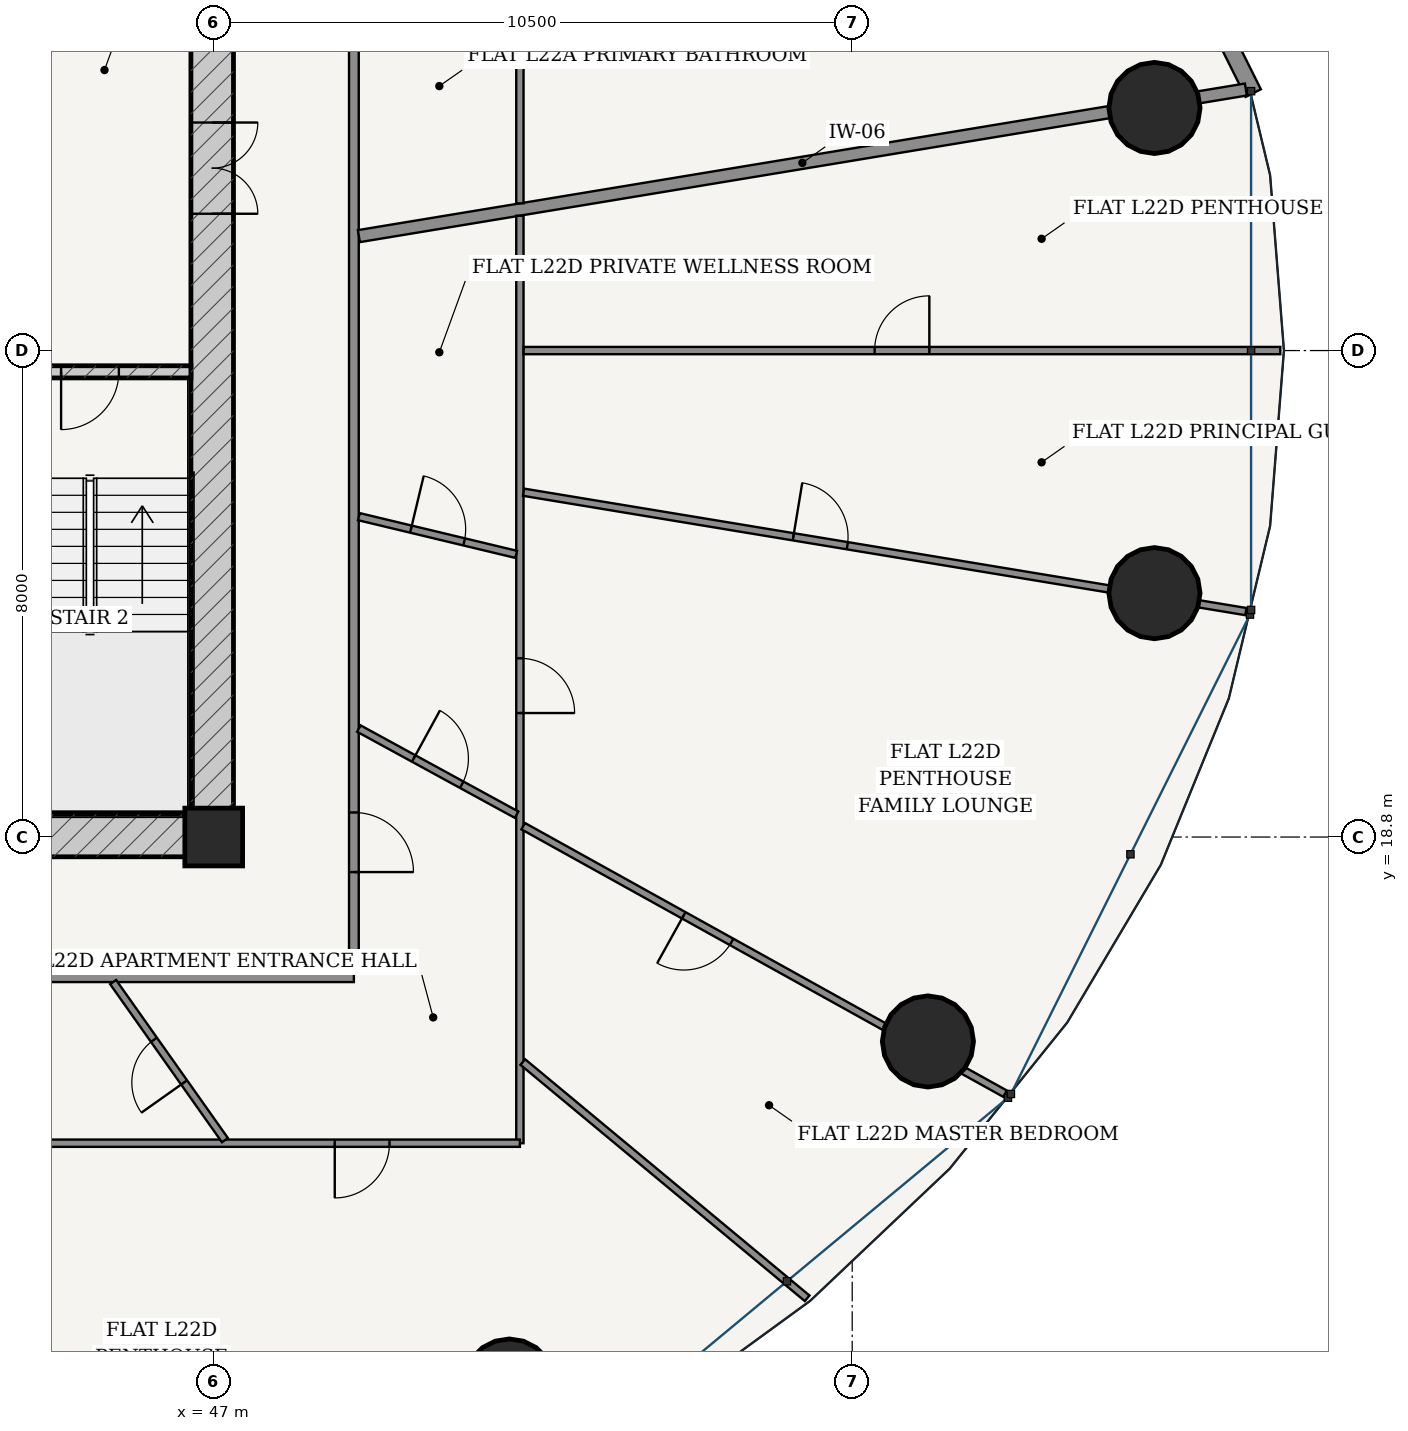
"""IFC4 building model, lengths in metres.
Left out: names, types, materials, properties, quantities, classifications, styles, units other than length and angle.
Written with IfcOpenShell. Run it as: python <this file> out.ifc"""

import sys

from ifc_helpers import new_model, si_unit, direction, frame, frame_2d, origin, origin_2d, place, context, subcontext, project, spatial, rectangle, hollow_circle, extrude, source, transform, mapped, element, fill, save


model = new_model("IFC4")
c1 = context("Model", 3, precision=1e-05, world=origin(), true_north=direction((-0.2419218956, 0.970295726276)))
c2 = subcontext(c1, "Body", "Model", "MODEL_VIEW")
j1 = project(units=[si_unit("LENGTHUNIT", "METRE"), si_unit("PLANEANGLEUNIT", "RADIAN")], contexts=[c1])
p1 = place(None, origin())
s1 = spatial("IfcSite", under=j1, at=p1, CompositionType="ELEMENT")
p2 = place(p1, origin())
s2 = spatial("IfcBuilding", under=s1, at=p2, CompositionType="ELEMENT")
p3 = place(p2, frame((0.0, 0.0, 87.0)))
s3 = spatial("IfcBuildingStorey", under=s2, at=p3, CompositionType="ELEMENT", Elevation=87.0)
p4 = place(p3, frame((47.0, 18.8, 0.0), z_axis=(0.0, 0.0, 1.0), x_axis=(1.0, 0.0, 0.0)))
e1 = element("IfcColumn", 1, at=p4, inside=s3, PredefinedType="COLUMN", context=c2, shape_type="SweptSolid", body=[
    extrude(rectangle(XDim=0.95, YDim=0.95, at=origin_2d()), origin(), (0.0, 0.0, 1.0), 3.6),
])
p5 = place(p3, frame((28.675, 18.825, 0.0), z_axis=(0.0, 0.0, 1.0), x_axis=(1.0, 0.0, 0.0)))
e2 = element("IfcWall", 2, at=p5, inside=s3, PredefinedType="SHEAR", context=c2, shape_type="SweptSolid", body=[
    extrude(rectangle(XDim=18.65, YDim=0.7, at=frame_2d((9.325, 0.0))), origin(), (0.0, 0.0, 1.0), 3.325),
])
p6 = place(p5, frame((7.577, 0.0, 0.0)))
e3 = element("IfcOpeningElement", 3, at=p6, cuts=e2, PredefinedType="OPENING", context=c2, shape_type="SweptSolid", body=[
    extrude(rectangle(XDim=0.85, YDim=2.1, at=frame_2d((0.425, 1.05))), frame((0.0, 0.36, 0.0), z_axis=(0.0, -1.0, 0.0), x_axis=(1.0, 0.0, 0.0)), (0.0, 0.0, 1.0), 0.72),
])
p7 = place(p5, frame((10.623, 0.0, 0.0)))
e4 = element("IfcOpeningElement", 4, at=p7, cuts=e2, PredefinedType="OPENING", context=c2, shape_type="SweptSolid", body=[
    extrude(rectangle(XDim=0.85, YDim=2.1, at=frame_2d((0.425, 1.05))), frame((0.0, 0.36, 0.0), z_axis=(0.0, -1.0, 0.0), x_axis=(1.0, 0.0, 0.0)), (0.0, 0.0, 1.0), 0.72),
])
p8 = place(p3, frame((46.975, 19.175, 0.0), z_axis=(0.0, 0.0, 1.0), x_axis=(0.0, 1.0, 0.0)))
e5 = element("IfcWall", 5, at=p8, inside=s3, PredefinedType="SHEAR", context=c2, shape_type="SweptSolid", body=[
    extrude(rectangle(XDim=15.25, YDim=0.7, at=frame_2d((7.625, 0.0))), origin(), (0.0, 0.0, 1.0), 3.325),
])
p9 = place(p8, frame((9.875, 0.0, 0.0)))
e6 = element("IfcOpeningElement", 6, at=p9, cuts=e5, PredefinedType="OPENING", context=c2, shape_type="SweptSolid", body=[
    extrude(rectangle(XDim=1.5, YDim=2.2, at=frame_2d((0.75, 1.1))), frame((0.0, 0.36, 0.0), z_axis=(0.0, -1.0, 0.0), x_axis=(1.0, 0.0, 0.0)), (0.0, 0.0, 1.0), 0.72),
])
p10 = place(p3, frame((43.305, 26.45, 0.0), z_axis=(0.0, 0.0, 1.0), x_axis=(1.0, 0.0, 0.0)))
e7 = element("IfcWall", 7, at=p10, inside=s3, PredefinedType="SOLIDWALL", context=c2, shape_type="SweptSolid", body=[
    extrude(rectangle(XDim=3.32, YDim=0.2, at=frame_2d((1.66, 0.0))), origin(), (0.0, 0.0, 1.0), 3.325),
])
p11 = place(p10, frame((1.185, 0.0, 0.0)))
e8 = element("IfcOpeningElement", 8, at=p11, cuts=e7, PredefinedType="OPENING", context=c2, shape_type="SweptSolid", body=[
    extrude(rectangle(XDim=0.95, YDim=2.15, at=frame_2d((0.475, 1.075))), frame((0.0, 0.11, 0.0), z_axis=(0.0, -1.0, 0.0), x_axis=(1.0, 0.0, 0.0)), (0.0, 0.0, 1.0), 0.22),
])
for number, where, z_axis, x_axis in (
    (9, (62.471, 30.79, 0.0), (0.0, 0.0, 1.0), (1.0, 0.0, 0.0)),
    (10, (51.862, 9.796, 0.0), (0.0, 0.0, 1.0), (1.0, 0.0, 0.0)),
    (11, (58.745, 15.438, 0.0), (0.0, 0.0, 1.0), (1.0, 0.0, 0.0)),
    (12, (62.471, 22.81, 0.0), (0.0, 0.0, 1.0), (1.0, 0.0, 0.0)),
):
    element("IfcColumn", number, at=place(p3, frame(where, z_axis=z_axis, x_axis=x_axis)), inside=s3, PredefinedType="COLUMN", context=c2, shape_type="SweptSolid", body=[
        extrude(hollow_circle(Radius=0.75, WallThickness=0.045, at=origin_2d()), origin(), (0.0, 0.0, 1.0), 3.6),
    ])
p12 = place(p3, frame((64.095, 31.034, 0.0), z_axis=(0.0, 0.0, 1.0), x_axis=(-0.446263788661, 0.894901464369, 0.0)))
e13 = element("IfcWall", 13, at=p12, inside=s3, PredefinedType="SOLIDWALL", context=c2, shape_type="SweptSolid", body=[
    extrude(rectangle(XDim=9.05, YDim=0.28, at=frame_2d((4.525, 0.0))), origin(), (0.0, 0.0, 1.0), 3.325),
])
p13 = place(p12, frame((1.394, 0.0, 0.85)))
e14 = element("IfcOpeningElement", 14, at=p13, cuts=e13, PredefinedType="OPENING", context=c2, shape_type="SweptSolid", body=[
    extrude(rectangle(XDim=2.1, YDim=1.95, at=frame_2d((1.05, 0.975))), frame((0.0, 0.15, 0.0), z_axis=(0.0, -1.0, 0.0), x_axis=(1.0, 0.0, 0.0)), (0.0, 0.0, 1.0), 0.3),
])
p14 = place(p12, frame((5.557, 0.0, 0.85)))
e15 = element("IfcOpeningElement", 15, at=p14, cuts=e13, PredefinedType="OPENING", context=c2, shape_type="SweptSolid", body=[
    extrude(rectangle(XDim=2.1, YDim=1.95, at=frame_2d((1.05, 0.975))), frame((0.0, 0.15, 0.0), z_axis=(0.0, -1.0, 0.0), x_axis=(1.0, 0.0, 0.0)), (0.0, 0.0, 1.0), 0.3),
])
p15 = place(p3, frame((26.695, 16.495, 0.0), z_axis=(0.0, 0.0, 1.0), x_axis=(1.0, 0.0, 0.0)))
e16 = element("IfcWall", 16, at=p15, inside=s3, PredefinedType="PARTITIONING", context=c2, shape_type="SweptSolid", body=[
    extrude(rectangle(XDim=22.61, YDim=0.16, at=frame_2d((11.305, 0.0))), origin(), (0.0, 0.0, 1.0), 2.767),
])
p16 = place(p3, frame((49.305, 16.575, 0.0), z_axis=(0.0, 0.0, 1.0), x_axis=(0.0, 1.0, 0.0)))
e17 = element("IfcWall", 17, at=p16, inside=s3, PredefinedType="PARTITIONING", context=c2, shape_type="SweptSolid", body=[
    extrude(rectangle(XDim=20.45, YDim=0.16, at=frame_2d((10.225, 0.0))), origin(), (0.0, 0.0, 1.0), 2.767),
])
p17 = place(p16, frame((1.649, 0.0, 0.0)))
e18 = element("IfcOpeningElement", 18, at=p17, cuts=e17, PredefinedType="OPENING", context=c2, shape_type="SweptSolid", body=[
    extrude(rectangle(XDim=0.98, YDim=2.2, at=frame_2d((0.49, 1.1))), frame((0.0, 0.09, 0.0), z_axis=(0.0, -1.0, 0.0), x_axis=(1.0, 0.0, 0.0)), (0.0, 0.0, 1.0), 0.18),
])
p18 = place(p3, frame((49.387, 28.682, 0.0), z_axis=(0.0, 0.0, 1.0), x_axis=(0.986617934215, 0.163049231479, 0.0)))
e19 = element("IfcWall", 19, at=p18, inside=s3, PredefinedType="PARTITIONING", context=c2, shape_type="SweptSolid", body=[
    extrude(rectangle(XDim=14.785, YDim=0.2, at=frame_2d((7.392, 0.0))), origin(), (0.0, 0.0, 1.0), 2.767),
])
p19 = place(p3, frame((52.035, 39.835, 0.0), z_axis=(0.0, 0.0, 1.0), x_axis=(0.0, -1.0, 0.0)))
e20 = element("IfcWall", 20, at=p19, inside=s3, PredefinedType="PARTITIONING", context=c2, shape_type="SweptSolid", body=[
    extrude(rectangle(XDim=10.614, YDim=0.12, at=frame_2d((5.307, 0.0))), origin(), (0.0, 0.0, 1.0), 2.767),
])
p20 = place(p19, frame((2.107, 0.0, 0.0)))
e21 = element("IfcOpeningElement", 21, at=p20, cuts=e20, PredefinedType="OPENING", context=c2, shape_type="SweptSolid", body=[
    extrude(rectangle(XDim=0.9, YDim=2.15, at=frame_2d((0.45, 1.075))), frame((0.0, 0.07, 0.0), z_axis=(0.0, -1.0, 0.0), x_axis=(1.0, 0.0, 0.0)), (0.0, 0.0, 1.0), 0.14),
])
p21 = place(p3, frame((52.035, 29.017, 0.0), z_axis=(0.0, 0.0, 1.0), x_axis=(0.0, -1.0, 0.0)))
e22 = element("IfcWall", 22, at=p21, inside=s3, PredefinedType="PARTITIONING", context=c2, shape_type="SweptSolid", body=[
    extrude(rectangle(XDim=15.252, YDim=0.12, at=frame_2d((7.626, 0.0))), origin(), (0.0, 0.0, 1.0), 2.767),
])
p22 = place(p21, frame((7.278, 0.0, 0.0)))
e23 = element("IfcOpeningElement", 23, at=p22, cuts=e22, PredefinedType="OPENING", context=c2, shape_type="SweptSolid", body=[
    extrude(rectangle(XDim=0.9, YDim=2.15, at=frame_2d((0.45, 1.075))), frame((0.0, 0.07, 0.0), z_axis=(0.0, -1.0, 0.0), x_axis=(1.0, 0.0, 0.0)), (0.0, 0.0, 1.0), 0.14),
])
p23 = place(p3, frame((52.035, 13.765, 0.0), z_axis=(0.0, 0.0, 1.0), x_axis=(-1.0, 0.0, 0.0)))
e24 = element("IfcWall", 24, at=p23, inside=s3, PredefinedType="PARTITIONING", context=c2, shape_type="SweptSolid", body=[
    extrude(rectangle(XDim=10.812, YDim=0.12, at=frame_2d((5.406, 0.0))), origin(), (0.0, 0.0, 1.0), 2.767),
])
p24 = place(p23, frame((2.145, 0.0, 0.0)))
e25 = element("IfcOpeningElement", 25, at=p24, cuts=e24, PredefinedType="OPENING", context=c2, shape_type="SweptSolid", body=[
    extrude(rectangle(XDim=0.9, YDim=2.15, at=frame_2d((0.45, 1.075))), frame((0.0, 0.07, 0.0), z_axis=(0.0, -1.0, 0.0), x_axis=(1.0, 0.0, 0.0)), (0.0, 0.0, 1.0), 0.14),
])
p25 = place(p3, frame((52.083, 15.1, 0.0), z_axis=(0.0, 0.0, 1.0), x_axis=(0.769161827891, -0.63905405289, 0.0)))
e26 = element("IfcWall", 26, at=p25, inside=s3, PredefinedType="PARTITIONING", context=c2, shape_type="SweptSolid", body=[
    extrude(rectangle(XDim=6.08, YDim=0.12, at=frame_2d((3.04, 0.0))), origin(), (0.0, 0.0, 1.0), 2.767),
])
p26 = place(p3, frame((52.089, 18.979, 0.0), z_axis=(0.0, 0.0, 1.0), x_axis=(0.874313476423, -0.485361664066, 0.0)))
e27 = element("IfcWall", 27, at=p26, inside=s3, PredefinedType="PARTITIONING", context=c2, shape_type="SweptSolid", body=[
    extrude(rectangle(XDim=9.066, YDim=0.12, at=frame_2d((4.533, 0.0))), origin(), (0.0, 0.0, 1.0), 2.767),
])
p27 = place(p26, frame((3.02, 0.0, 0.0)))
e28 = element("IfcOpeningElement", 28, at=p27, cuts=e27, PredefinedType="OPENING", context=c2, shape_type="SweptSolid", body=[
    extrude(rectangle(XDim=0.9, YDim=2.15, at=frame_2d((0.45, 1.075))), frame((0.0, 0.07, 0.0), z_axis=(0.0, -1.0, 0.0), x_axis=(1.0, 0.0, 0.0)), (0.0, 0.0, 1.0), 0.14),
])
p28 = place(p3, frame((52.096, 24.47, 0.0), z_axis=(0.0, 0.0, 1.0), x_axis=(0.986618264768, -0.163047231274, 0.0)))
e29 = element("IfcWall", 29, at=p28, inside=s3, PredefinedType="PARTITIONING", context=c2, shape_type="SweptSolid", body=[
    extrude(rectangle(XDim=12.039, YDim=0.12, at=frame_2d((6.02, 0.0))), origin(), (0.0, 0.0, 1.0), 2.767),
])
p29 = place(p28, frame((4.496, 0.0, 0.0)))
e30 = element("IfcOpeningElement", 30, at=p29, cuts=e29, PredefinedType="OPENING", context=c2, shape_type="SweptSolid", body=[
    extrude(rectangle(XDim=0.9, YDim=2.15, at=frame_2d((0.45, 1.075))), frame((0.0, 0.07, 0.0), z_axis=(0.0, -1.0, 0.0), x_axis=(1.0, 0.0, 0.0)), (0.0, 0.0, 1.0), 0.14),
])
p30 = place(p3, frame((52.097, 26.8, 0.0), z_axis=(0.0, 0.0, 1.0), x_axis=(1.0, 0.0, 0.0)))
e31 = element("IfcWall", 31, at=p30, inside=s3, PredefinedType="PARTITIONING", context=c2, shape_type="SweptSolid", body=[
    extrude(rectangle(XDim=12.443, YDim=0.12, at=frame_2d((6.222, 0.0))), origin(), (0.0, 0.0, 1.0), 2.767),
])
p31 = place(p30, frame((5.771, 0.0, 0.0)))
e32 = element("IfcOpeningElement", 32, at=p31, cuts=e31, PredefinedType="OPENING", context=c2, shape_type="SweptSolid", body=[
    extrude(rectangle(XDim=0.9, YDim=2.15, at=frame_2d((0.45, 1.075))), frame((0.0, 0.07, 0.0), z_axis=(0.0, -1.0, 0.0), x_axis=(1.0, 0.0, 0.0)), (0.0, 0.0, 1.0), 0.14),
])
p32 = place(p3, frame((45.345, 16.415, 0.0), z_axis=(0.0, 0.0, 1.0), x_axis=(0.577474693199, -0.816408585645, 0.0)))
e33 = element("IfcWall", 33, at=p32, inside=s3, PredefinedType="PARTITIONING", context=c2, shape_type="SweptSolid", body=[
    extrude(rectangle(XDim=3.184, YDim=0.12, at=frame_2d((1.592, 0.0))), origin(), (0.0, 0.0, 1.0), 3.004),
])
p33 = place(p32, frame((1.162, 0.0, 0.0)))
e34 = element("IfcOpeningElement", 34, at=p33, cuts=e33, PredefinedType="OPENING", context=c2, shape_type="SweptSolid", body=[
    extrude(rectangle(XDim=0.86, YDim=2.15, at=frame_2d((0.43, 1.075))), frame((0.0, 0.07, 0.0), z_axis=(0.0, -1.0, 0.0), x_axis=(1.0, 0.0, 0.0)), (0.0, 0.0, 1.0), 0.14),
])
p34 = place(p3, frame((49.387, 20.583, 0.0), z_axis=(0.0, 0.0, 1.0), x_axis=(0.877718703033, -0.479176249773, 0.0)))
e35 = element("IfcWall", 35, at=p34, inside=s3, PredefinedType="PARTITIONING", context=c2, shape_type="SweptSolid", body=[
    extrude(rectangle(XDim=2.955, YDim=0.12, at=frame_2d((1.478, 0.0))), origin(), (0.0, 0.0, 1.0), 2.767),
])
p35 = place(p34, frame((1.028, 0.0, 0.0)))
e36 = element("IfcOpeningElement", 36, at=p35, cuts=e35, PredefinedType="OPENING", context=c2, shape_type="SweptSolid", body=[
    extrude(rectangle(XDim=0.9, YDim=2.15, at=frame_2d((0.45, 1.075))), frame((0.0, 0.07, 0.0), z_axis=(0.0, -1.0, 0.0), x_axis=(1.0, 0.0, 0.0)), (0.0, 0.0, 1.0), 0.14),
])
p36 = place(p3, frame((49.387, 24.069, 0.0), z_axis=(0.0, 0.0, 1.0), x_axis=(0.972423933179, -0.233220269661, 0.0)))
e37 = element("IfcWall", 37, at=p36, inside=s3, PredefinedType="PARTITIONING", context=c2, shape_type="SweptSolid", body=[
    extrude(rectangle(XDim=2.661, YDim=0.12, at=frame_2d((1.331, 0.0))), origin(), (0.0, 0.0, 1.0), 3.325),
])
p37 = place(p36, frame((0.881, 0.0, 0.0)))
e38 = element("IfcOpeningElement", 38, at=p37, cuts=e37, PredefinedType="OPENING", context=c2, shape_type="SweptSolid", body=[
    extrude(rectangle(XDim=0.9, YDim=2.15, at=frame_2d((0.45, 1.075))), frame((0.0, 0.07, 0.0), z_axis=(0.0, -1.0, 0.0), x_axis=(1.0, 0.0, 0.0)), (0.0, 0.0, 1.0), 0.14),
])
m1 = source(origin(), c2, "Body", "SweptSolid", [
    extrude(rectangle(XDim=1.5, YDim=2.2, at=frame_2d((0.75, 1.1))), frame((0.0, 0.025, 0.0), z_axis=(0.0, -1.0, 0.0), x_axis=(1.0, 0.0, 0.0)), (0.0, 0.0, 1.0), 0.05),
])
p38 = place(p9, frame((1.5, 0.0, 0.0), z_axis=(0.0, 0.0, 1.0), x_axis=(-1.0, 0.0, 0.0)))
e39 = element("IfcDoor", 39, at=p38, inside=s3, OperationType="DOUBLE_DOOR_SINGLE_SWING", PredefinedType="DOOR", context=c2, shape_type="MappedRepresentation", body=[
    mapped(m1, transform((0.0, 0.0, 0.0), scale=1.0)),
])
fill(e6, e39)
m2 = source(origin(), c2, "Body", "SweptSolid", [
    extrude(rectangle(XDim=0.95, YDim=2.15, at=frame_2d((0.475, 1.075))), frame((0.0, 0.025, 0.0), z_axis=(0.0, -1.0, 0.0), x_axis=(1.0, 0.0, 0.0)), (0.0, 0.0, 1.0), 0.05),
])
p39 = place(p11, frame((0.95, 0.0, 0.0), z_axis=(0.0, 0.0, 1.0), x_axis=(-1.0, 0.0, 0.0)))
e40 = element("IfcDoor", 40, at=p39, inside=s3, OperationType="SINGLE_SWING_RIGHT", PredefinedType="DOOR", context=c2, shape_type="MappedRepresentation", body=[
    mapped(m2, transform((0.0, 0.0, 0.0), scale=1.0)),
])
fill(e8, e40)
m3 = source(origin(), c2, "Body", "SweptSolid", [
    extrude(rectangle(XDim=0.98, YDim=2.2, at=frame_2d((0.49, 1.1))), frame((0.0, 0.025, 0.0), z_axis=(0.0, -1.0, 0.0), x_axis=(1.0, 0.0, 0.0)), (0.0, 0.0, 1.0), 0.05),
])
p40 = place(p17, frame((0.98, 0.0, 0.0), z_axis=(0.0, 0.0, 1.0), x_axis=(-1.0, 0.0, 0.0)))
e41 = element("IfcDoor", 41, at=p40, inside=s3, OperationType="SINGLE_SWING_RIGHT", PredefinedType="DOOR", context=c2, shape_type="MappedRepresentation", body=[
    mapped(m3, transform((0.0, 0.0, 0.0), scale=1.0)),
])
fill(e18, e41)
m4 = source(origin(), c2, "Body", "SweptSolid", [
    extrude(rectangle(XDim=0.86, YDim=2.15, at=frame_2d((0.43, 1.075))), frame((0.0, 0.025, 0.0), z_axis=(0.0, -1.0, 0.0), x_axis=(1.0, 0.0, 0.0)), (0.0, 0.0, 1.0), 0.05),
])
p41 = place(p33, frame((0.86, 0.0, 0.0), z_axis=(0.0, 0.0, 1.0), x_axis=(-1.0, 0.0, 0.0)))
e42 = element("IfcDoor", 42, at=p41, inside=s3, OperationType="SINGLE_SWING_LEFT", PredefinedType="DOOR", context=c2, shape_type="MappedRepresentation", body=[
    mapped(m4, transform((0.0, 0.0, 0.0), scale=1.0)),
])
fill(e34, e42)
m5 = source(origin(), c2, "Body", "SweptSolid", [
    extrude(rectangle(XDim=0.9, YDim=2.15, at=frame_2d((0.45, 1.075))), frame((0.0, 0.025, 0.0), z_axis=(0.0, -1.0, 0.0), x_axis=(1.0, 0.0, 0.0)), (0.0, 0.0, 1.0), 0.05),
])
p42 = place(p24, origin())
e43 = element("IfcDoor", 43, at=p42, inside=s3, OperationType="SINGLE_SWING_RIGHT", PredefinedType="DOOR", context=c2, shape_type="MappedRepresentation", body=[
    mapped(m5, transform((0.0, 0.0, 0.0), scale=1.0)),
])
fill(e25, e43)
p43 = place(p35, origin())
e44 = element("IfcDoor", 44, at=p43, inside=s3, OperationType="SINGLE_SWING_LEFT", PredefinedType="DOOR", context=c2, shape_type="MappedRepresentation", body=[
    mapped(m5, transform((0.0, 0.0, 0.0), scale=1.0)),
])
fill(e36, e44)
p44 = place(p22, origin())
e45 = element("IfcDoor", 45, at=p44, inside=s3, OperationType="SINGLE_SWING_RIGHT", PredefinedType="DOOR", context=c2, shape_type="MappedRepresentation", body=[
    mapped(m5, transform((0.0, 0.0, 0.0), scale=1.0)),
])
fill(e23, e45)
p45 = place(p37, origin())
e46 = element("IfcDoor", 46, at=p45, inside=s3, OperationType="SINGLE_SWING_LEFT", PredefinedType="DOOR", context=c2, shape_type="MappedRepresentation", body=[
    mapped(m5, transform((0.0, 0.0, 0.0), scale=1.0)),
])
fill(e38, e46)
p46 = place(p27, frame((0.9, 0.0, 0.0), z_axis=(0.0, 0.0, 1.0), x_axis=(-1.0, 0.0, 0.0)))
e47 = element("IfcDoor", 47, at=p46, inside=s3, OperationType="SINGLE_SWING_RIGHT", PredefinedType="DOOR", context=c2, shape_type="MappedRepresentation", body=[
    mapped(m5, transform((0.0, 0.0, 0.0), scale=1.0)),
])
fill(e28, e47)
p47 = place(p29, origin())
e48 = element("IfcDoor", 48, at=p47, inside=s3, OperationType="SINGLE_SWING_LEFT", PredefinedType="DOOR", context=c2, shape_type="MappedRepresentation", body=[
    mapped(m5, transform((0.0, 0.0, 0.0), scale=1.0)),
])
fill(e30, e48)
p48 = place(p31, origin())
e49 = element("IfcDoor", 49, at=p48, inside=s3, OperationType="SINGLE_SWING_RIGHT", PredefinedType="DOOR", context=c2, shape_type="MappedRepresentation", body=[
    mapped(m5, transform((0.0, 0.0, 0.0), scale=1.0)),
])
fill(e32, e49)
save(model, sys.argv[1])
